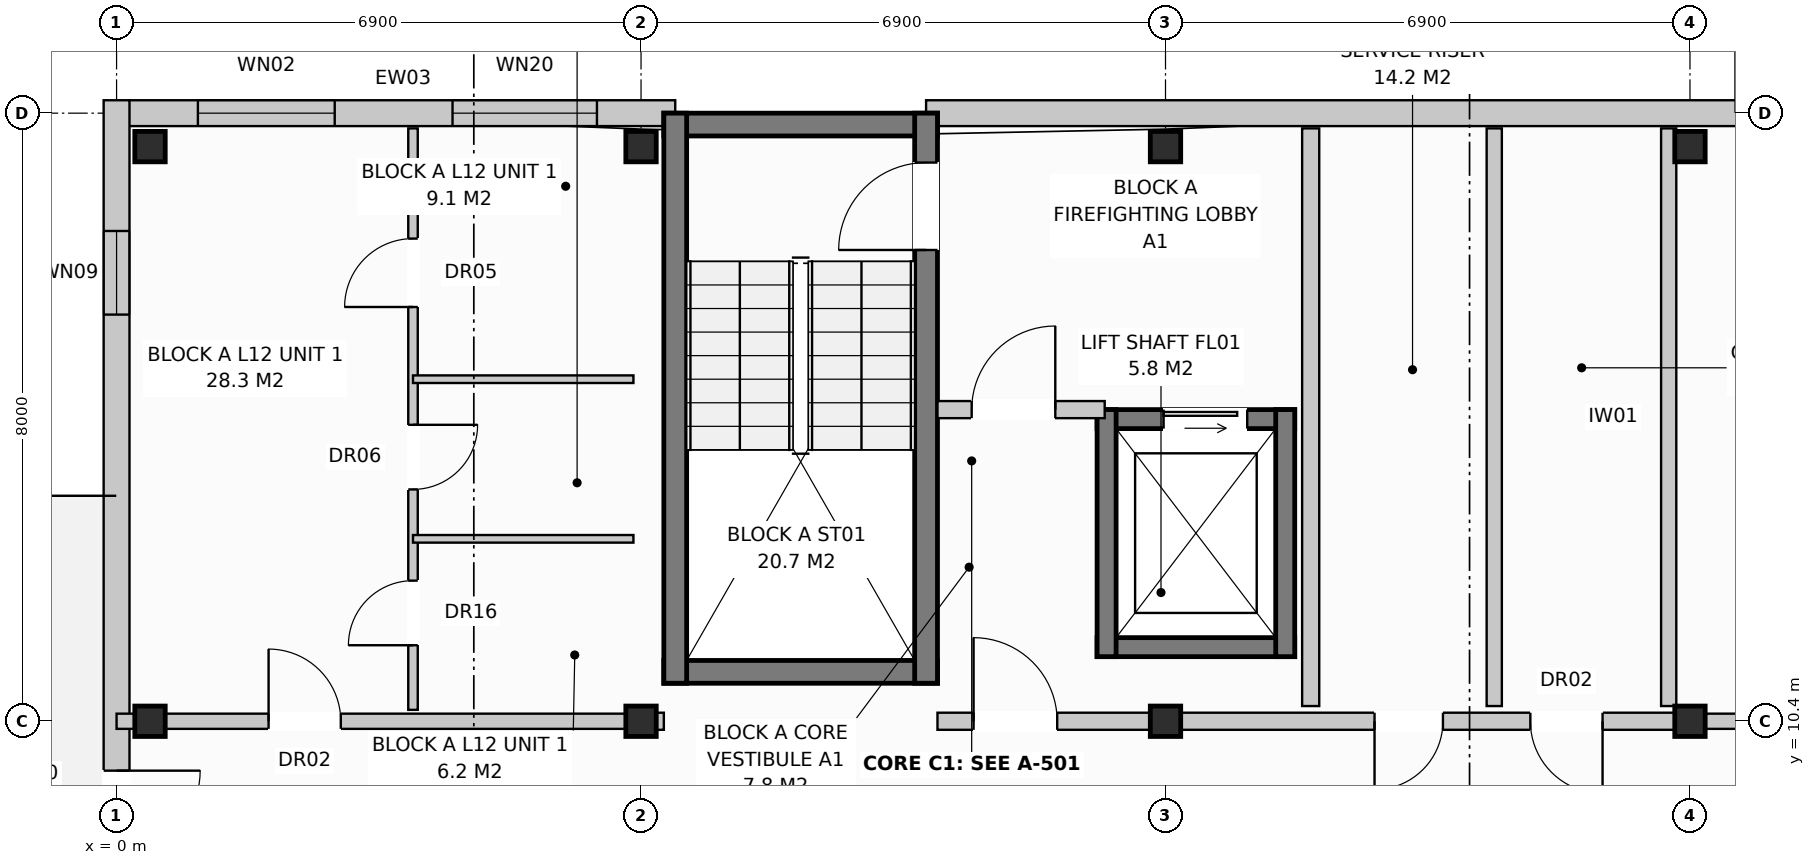
"""IFC4 building model, lengths in metres.
Left out: names, types, materials, properties, quantities, classifications, styles, units other than length and angle.
Written with IfcOpenShell. Run it as: python <this file> out.ifc"""

import sys

from ifc_helpers import new_model, si_unit, direction, frame, frame_2d, origin, origin_with_axes, origin_2d, place, context, subcontext, project, spatial, rectangle, extrude, element, fill, save


model = new_model("IFC4")
c1 = context("Model", 3, precision=1e-05, world=origin(), true_north=direction((0.0, 1.0)))
c2 = subcontext(c1, "Body", "Model", "MODEL_VIEW")
j1 = project(units=[si_unit("LENGTHUNIT", "METRE"), si_unit("PLANEANGLEUNIT", "RADIAN")], contexts=[c1])
p1 = place(None, origin())
s1 = spatial("IfcSite", under=j1, at=p1, CompositionType="ELEMENT")
p2 = place(p1, origin())
s2 = spatial("IfcBuilding", under=s1, at=p2, CompositionType="ELEMENT")
p3 = place(p2, frame((0.0, 0.0, 40.0)))
s3 = spatial("IfcBuildingStorey", under=s2, at=p3, CompositionType="ELEMENT", Elevation=40.0)
for number, where, z_axis, x_axis in (
    (1, (0.44, 10.4, 0.0), (0.0, 0.0, 1.0), (1.0, 0.0, 0.0)),
    (2, (0.44, 17.96, 0.0), (0.0, 0.0, 1.0), (1.0, 0.0, 0.0)),
    (3, (6.9, 10.4, 0.0), (0.0, 0.0, 1.0), (1.0, 0.0, 0.0)),
    (4, (6.9, 17.96, 0.0), (0.0, 0.0, 1.0), (1.0, 0.0, 0.0)),
    (5, (13.8, 10.4, 0.0), (0.0, 0.0, 1.0), (1.0, 0.0, 0.0)),
    (6, (13.8, 17.96, 0.0), (0.0, 0.0, 1.0), (1.0, 0.0, 0.0)),
    (7, (20.7, 10.4, 0.0), (0.0, 0.0, 1.0), (1.0, 0.0, 0.0)),
    (8, (20.7, 17.96, 0.0), (0.0, 0.0, 1.0), (1.0, 0.0, 0.0)),
):
    element("IfcColumn", number, at=place(p3, frame(where, z_axis=z_axis, x_axis=x_axis)), inside=s3, PredefinedType="COLUMN", context=c2, shape_type="SweptSolid", body=[
        extrude(rectangle(XDim=0.4, YDim=0.4, at=origin_2d()), origin(), (0.0, 0.0, 1.0), 3.2),
    ])
p4 = place(p3, frame((0.16, 18.4, 0.0), z_axis=(0.0, 0.0, 1.0), x_axis=(1.0, 0.0, 0.0)))
e9 = element("IfcWall", 9, at=p4, inside=s3, PredefinedType="STANDARD", context=c2, shape_type="SweptSolid", body=[
    extrude(rectangle(XDim=7.19, YDim=0.34, at=frame_2d((3.595, 0.0))), origin(), (0.0, 0.0, 1.0), 2.97),
])
p5 = place(p4, frame((0.91, 0.0, 0.8)))
e10 = element("IfcOpeningElement", 10, at=p5, cuts=e9, PredefinedType="OPENING", context=c2, shape_type="SweptSolid", body=[
    extrude(rectangle(XDim=1.8, YDim=1.7, at=frame_2d((0.9, 0.85))), frame((0.0, 0.182, 0.0), z_axis=(0.0, -1.0, 0.0), x_axis=(1.0, 0.0, 0.0)), (0.0, 0.0, 1.0), 0.364),
])
p6 = place(p4, frame((4.26, 0.0, 0.8)))
e11 = element("IfcOpeningElement", 11, at=p6, cuts=e9, PredefinedType="OPENING", context=c2, shape_type="SweptSolid", body=[
    extrude(rectangle(XDim=1.9, YDim=1.85, at=frame_2d((0.95, 0.925))), frame((0.0, 0.182, 0.0), z_axis=(0.0, -1.0, 0.0), x_axis=(1.0, 0.0, 0.0)), (0.0, 0.0, 1.0), 0.364),
])
p7 = place(p3, frame((10.65, 18.4, 0.0), z_axis=(0.0, 0.0, 1.0), x_axis=(1.0, 0.0, 0.0)))
e12 = element("IfcWall", 12, at=p7, inside=s3, PredefinedType="STANDARD", context=c2, shape_type="SweptSolid", body=[
    extrude(rectangle(XDim=17.4, YDim=0.34, at=frame_2d((8.7, 0.0))), origin(), (0.0, 0.0, 1.0), 2.97),
])
p8 = place(p7, frame((11.82, 0.0, 0.0)))
e13 = element("IfcOpeningElement", 13, at=p8, cuts=e12, PredefinedType="OPENING", context=c2, shape_type="SweptSolid", body=[
    extrude(rectangle(XDim=1.05, YDim=2.12, at=frame_2d((0.525, 1.06))), frame((0.0, 0.182, 0.0), z_axis=(0.0, -1.0, 0.0), x_axis=(1.0, 0.0, 0.0)), (0.0, 0.0, 1.0), 0.364),
])
p9 = place(p7, frame((14.87, 0.0, 0.72)))
e14 = element("IfcOpeningElement", 14, at=p9, cuts=e12, PredefinedType="OPENING", context=c2, shape_type="SweptSolid", body=[
    extrude(rectangle(XDim=1.1, YDim=1.5, at=frame_2d((0.55, 0.75))), frame((0.0, 0.182, 0.0), z_axis=(0.0, -1.0, 0.0), x_axis=(1.0, 0.0, 0.0)), (0.0, 0.0, 1.0), 0.364),
])
p10 = place(p3, frame((0.0, -0.17, 0.0), z_axis=(0.0, 0.0, 1.0), x_axis=(0.0, 1.0, 0.0)))
e15 = element("IfcWall", 15, at=p10, inside=s3, PredefinedType="STANDARD", context=c2, shape_type="SweptSolid", body=[
    extrude(rectangle(XDim=18.74, YDim=0.34, at=frame_2d((9.37, 0.0))), origin(), (0.0, 0.0, 1.0), 2.97),
])
p11 = place(p10, frame((8.82, 0.0, 0.0)))
e16 = element("IfcOpeningElement", 16, at=p11, cuts=e15, PredefinedType="OPENING", context=c2, shape_type="SweptSolid", body=[
    extrude(rectangle(XDim=1.1, YDim=2.1, at=frame_2d((0.55, 1.05))), frame((0.0, 0.182, 0.0), z_axis=(0.0, -1.0, 0.0), x_axis=(1.0, 0.0, 0.0)), (0.0, 0.0, 1.0), 0.364),
])
p12 = place(p10, frame((1.72, 0.0, 0.72)))
e17 = element("IfcOpeningElement", 17, at=p12, cuts=e15, PredefinedType="OPENING", context=c2, shape_type="SweptSolid", body=[
    extrude(rectangle(XDim=1.1, YDim=1.5, at=frame_2d((0.55, 0.75))), frame((0.0, 0.182, 0.0), z_axis=(0.0, -1.0, 0.0), x_axis=(1.0, 0.0, 0.0)), (0.0, 0.0, 1.0), 0.364),
])
p13 = place(p10, frame((15.92, 0.0, 0.72)))
e18 = element("IfcOpeningElement", 18, at=p13, cuts=e15, PredefinedType="OPENING", context=c2, shape_type="SweptSolid", body=[
    extrude(rectangle(XDim=1.1, YDim=1.5, at=frame_2d((0.55, 0.75))), frame((0.0, 0.182, 0.0), z_axis=(0.0, -1.0, 0.0), x_axis=(1.0, 0.0, 0.0)), (0.0, 0.0, 1.0), 0.364),
])
for number, where, z_axis, x_axis in (
    (19, (7.2, 18.25, 0.0), (0.0, 0.0, 1.0), (1.0, 0.0, 0.0)),
    (20, (7.2, 11.05, 0.0), (0.0, 0.0, 1.0), (1.0, 0.0, 0.0)),
):
    element("IfcWall", number, at=place(p3, frame(where, z_axis=z_axis, x_axis=x_axis)), inside=s3, PredefinedType="SHEAR", context=c2, shape_type="SweptSolid", body=[
        extrude(rectangle(XDim=3.6, YDim=0.3, at=frame_2d((1.8, 0.0))), origin(), (0.0, 0.0, 1.0), 2.97),
    ])
p14 = place(p3, frame((7.35, 10.9, 0.0), z_axis=(0.0, 0.0, 1.0), x_axis=(0.0, 1.0, 0.0)))
e21 = element("IfcWall", 21, at=p14, inside=s3, PredefinedType="SHEAR", context=c2, shape_type="SweptSolid", body=[
    extrude(rectangle(XDim=7.5, YDim=0.3, at=frame_2d((3.75, 0.0))), origin(), (0.0, 0.0, 1.0), 2.97),
])
p15 = place(p3, frame((10.65, 10.9, 0.0), z_axis=(0.0, 0.0, 1.0), x_axis=(0.0, 1.0, 0.0)))
e22 = element("IfcWall", 22, at=p15, inside=s3, PredefinedType="SHEAR", context=c2, shape_type="SweptSolid", body=[
    extrude(rectangle(XDim=7.5, YDim=0.3, at=frame_2d((3.75, 0.0))), origin(), (0.0, 0.0, 1.0), 2.97),
])
p16 = place(p15, frame((5.7, 0.0, 0.0)))
e23 = element("IfcOpeningElement", 23, at=p16, cuts=e22, PredefinedType="OPENING", context=c2, shape_type="SweptSolid", body=[
    extrude(rectangle(XDim=1.15, YDim=2.15, at=frame_2d((0.575, 1.075))), frame((0.0, 0.162, 0.0), z_axis=(0.0, -1.0, 0.0), x_axis=(1.0, 0.0, 0.0)), (0.0, 0.0, 1.0), 0.324),
])
p17 = place(p3, frame((12.9, 14.375, 0.0), z_axis=(0.0, 0.0, 1.0), x_axis=(1.0, 0.0, 0.0)))
e24 = element("IfcWall", 24, at=p17, inside=s3, PredefinedType="SHEAR", context=c2, shape_type="SweptSolid", body=[
    extrude(rectangle(XDim=2.6, YDim=0.25, at=frame_2d((1.3, 0.0))), origin(), (0.0, 0.0, 1.0), 2.97),
])
p18 = place(p17, frame((0.875, 0.0, 0.0)))
e25 = element("IfcOpeningElement", 25, at=p18, cuts=e24, PredefinedType="OPENING", context=c2, shape_type="SweptSolid", body=[
    extrude(rectangle(XDim=1.1, YDim=2.1, at=frame_2d((0.55, 1.05))), frame((0.0, 0.137, 0.0), z_axis=(0.0, -1.0, 0.0), x_axis=(1.0, 0.0, 0.0)), (0.0, 0.0, 1.0), 0.274),
])
p19 = place(p3, frame((12.9, 11.375, 0.0), z_axis=(0.0, 0.0, 1.0), x_axis=(1.0, 0.0, 0.0)))
e26 = element("IfcWall", 26, at=p19, inside=s3, PredefinedType="SHEAR", context=c2, shape_type="SweptSolid", body=[
    extrude(rectangle(XDim=2.6, YDim=0.25, at=frame_2d((1.3, 0.0))), origin(), (0.0, 0.0, 1.0), 2.97),
])
for number, where, z_axis, x_axis in (
    (27, (13.025, 11.25, 0.0), (0.0, 0.0, 1.0), (0.0, 1.0, 0.0)),
    (28, (15.375, 11.25, 0.0), (0.0, 0.0, 1.0), (0.0, 1.0, 0.0)),
):
    element("IfcWall", number, at=place(p3, frame(where, z_axis=z_axis, x_axis=x_axis)), inside=s3, PredefinedType="SHEAR", context=c2, shape_type="SweptSolid", body=[
        extrude(rectangle(XDim=3.25, YDim=0.25, at=frame_2d((1.625, 0.0))), origin(), (0.0, 0.0, 1.0), 2.97),
    ])
p20 = place(p3, frame((15.71, 10.6, 0.0), z_axis=(0.0, 0.0, 1.0), x_axis=(0.0, 1.0, 0.0)))
e29 = element("IfcWall", 29, at=p20, inside=s3, PredefinedType="PARTITIONING", context=c2, shape_type="SweptSolid", body=[
    extrude(rectangle(XDim=7.6, YDim=0.225, at=frame_2d((3.8, 0.0))), origin(), (0.0, 0.0, 1.0), 2.59),
])
p21 = place(p3, frame((10.8, 14.5, 0.0), z_axis=(0.0, 0.0, 1.0), x_axis=(1.0, 0.0, 0.0)))
e30 = element("IfcWall", 30, at=p21, inside=s3, PredefinedType="PARTITIONING", context=c2, shape_type="SweptSolid", body=[
    extrude(rectangle(XDim=2.2, YDim=0.225, at=frame_2d((1.1, 0.0))), origin(), (0.0, 0.0, 1.0), 2.97),
])
p22 = place(p21, frame((0.45, 0.0, 0.0)))
e31 = element("IfcOpeningElement", 31, at=p22, cuts=e30, PredefinedType="OPENING", context=c2, shape_type="SweptSolid", body=[
    extrude(rectangle(XDim=1.1, YDim=2.15, at=frame_2d((0.55, 1.075))), frame((0.0, 0.125, 0.0), z_axis=(0.0, -1.0, 0.0), x_axis=(1.0, 0.0, 0.0)), (0.0, 0.0, 1.0), 0.249),
])
p23 = place(p3, frame((6.9, 10.4, 0.0), z_axis=(0.0, 0.0, 1.0), x_axis=(1.0, 0.0, 0.0)))
e32 = element("IfcWall", 32, at=p23, inside=s3, PredefinedType="PARTITIONING", context=c2, shape_type="SweptSolid", body=[
    extrude(rectangle(XDim=0.3, YDim=0.225, at=frame_2d((0.15, 0.0))), origin(), (0.0, 0.0, 1.0), 2.97),
])
for number, where, z_axis, x_axis in (
    (33, (18.125, 10.6, 0.0), (0.0, 0.0, 1.0), (0.0, 1.0, 0.0)),
    (34, (20.42, 10.6, 0.0), (0.0, 0.0, 1.0), (0.0, 1.0, 0.0)),
):
    element("IfcWall", number, at=place(p3, frame(where, z_axis=z_axis, x_axis=x_axis)), inside=s3, PredefinedType="PARTITIONING", context=c2, shape_type="SweptSolid", body=[
        extrude(rectangle(XDim=7.6, YDim=0.2, at=frame_2d((3.8, 0.0))), origin(), (0.0, 0.0, 1.0), 2.97),
    ])
p24 = place(p3, frame((10.8, 10.4, 0.0), z_axis=(0.0, 0.0, 1.0), x_axis=(1.0, 0.0, 0.0)))
e35 = element("IfcWall", 35, at=p24, inside=s3, PredefinedType="PARTITIONING", context=c2, shape_type="SweptSolid", body=[
    extrude(rectangle(XDim=9.9, YDim=0.225, at=frame_2d((4.95, 0.0))), origin(), (0.0, 0.0, 1.0), 2.41),
])
p25 = place(p24, frame((0.475, 0.0, 0.0)))
e36 = element("IfcOpeningElement", 36, at=p25, cuts=e35, PredefinedType="OPENING", context=c2, shape_type="SweptSolid", body=[
    extrude(rectangle(XDim=1.1, YDim=2.15, at=frame_2d((0.55, 1.075))), frame((0.0, 0.125, 0.0), z_axis=(0.0, -1.0, 0.0), x_axis=(1.0, 0.0, 0.0)), (0.0, 0.0, 1.0), 0.249),
])
p26 = place(p24, frame((5.75, 0.0, 0.0)))
e37 = element("IfcOpeningElement", 37, at=p26, cuts=e35, PredefinedType="OPENING", context=c2, shape_type="SweptSolid", body=[
    extrude(rectangle(XDim=0.9, YDim=2.1, at=frame_2d((0.45, 1.05))), frame((0.0, 0.125, 0.0), z_axis=(0.0, -1.0, 0.0), x_axis=(1.0, 0.0, 0.0)), (0.0, 0.0, 1.0), 0.249),
])
p27 = place(p24, frame((7.8, 0.0, 0.0)))
e38 = element("IfcOpeningElement", 38, at=p27, cuts=e35, PredefinedType="OPENING", context=c2, shape_type="SweptSolid", body=[
    extrude(rectangle(XDim=0.95, YDim=2.15, at=frame_2d((0.475, 1.075))), frame((0.0, 0.125, 0.0), z_axis=(0.0, -1.0, 0.0), x_axis=(1.0, 0.0, 0.0)), (0.0, 0.0, 1.0), 0.249),
])
p28 = place(p3, frame((0.0, 10.4, 0.0), z_axis=(0.0, 0.0, 1.0), x_axis=(1.0, 0.0, 0.0)))
e39 = element("IfcWall", 39, at=p28, inside=s3, PredefinedType="PARTITIONING", context=c2, shape_type="SweptSolid", body=[
    extrude(rectangle(XDim=6.9, YDim=0.2, at=frame_2d((3.45, 0.0))), origin(), (0.0, 0.0, 1.0), 2.41),
])
p29 = place(p28, frame((2.0, 0.0, 0.0)))
e40 = element("IfcOpeningElement", 40, at=p29, cuts=e39, PredefinedType="OPENING", context=c2, shape_type="SweptSolid", body=[
    extrude(rectangle(XDim=0.95, YDim=2.15, at=frame_2d((0.475, 1.075))), frame((0.0, 0.112, 0.0), z_axis=(0.0, -1.0, 0.0), x_axis=(1.0, 0.0, 0.0)), (0.0, 0.0, 1.0), 0.224),
])
p30 = place(p3, frame((3.9, 10.55, 0.0), z_axis=(0.0, 0.0, 1.0), x_axis=(0.0, 1.0, 0.0)))
e41 = element("IfcWall", 41, at=p30, inside=s3, PredefinedType="PARTITIONING", context=c2, shape_type="SweptSolid", body=[
    extrude(rectangle(XDim=7.65, YDim=0.125, at=frame_2d((3.825, 0.0))), origin(), (0.0, 0.0, 1.0), 2.97),
])
p31 = place(p30, frame((0.85, 0.0, 0.0)))
e42 = element("IfcOpeningElement", 42, at=p31, cuts=e41, PredefinedType="OPENING", context=c2, shape_type="SweptSolid", body=[
    extrude(rectangle(XDim=0.85, YDim=2.1, at=frame_2d((0.425, 1.05))), frame((0.0, 0.074, 0.0), z_axis=(0.0, -1.0, 0.0), x_axis=(1.0, 0.0, 0.0)), (0.0, 0.0, 1.0), 0.149),
])
p32 = place(p30, frame((2.9, 0.0, 0.0)))
e43 = element("IfcOpeningElement", 43, at=p32, cuts=e41, PredefinedType="OPENING", context=c2, shape_type="SweptSolid", body=[
    extrude(rectangle(XDim=0.85, YDim=2.05, at=frame_2d((0.425, 1.025))), frame((0.0, 0.074, 0.0), z_axis=(0.0, -1.0, 0.0), x_axis=(1.0, 0.0, 0.0)), (0.0, 0.0, 1.0), 0.149),
])
p33 = place(p30, frame((5.3, 0.0, 0.0)))
e44 = element("IfcOpeningElement", 44, at=p33, cuts=e41, PredefinedType="OPENING", context=c2, shape_type="SweptSolid", body=[
    extrude(rectangle(XDim=0.9, YDim=2.1, at=frame_2d((0.45, 1.05))), frame((0.0, 0.074, 0.0), z_axis=(0.0, -1.0, 0.0), x_axis=(1.0, 0.0, 0.0)), (0.0, 0.0, 1.0), 0.149),
])
for number, where, z_axis, x_axis in (
    (45, (3.9, 12.8, 0.0), (0.0, 0.0, 1.0), (1.0, 0.0, 0.0)),
    (46, (3.9, 14.9, 0.0), (0.0, 0.0, 1.0), (1.0, 0.0, 0.0)),
):
    element("IfcWall", number, at=place(p3, frame(where, z_axis=z_axis, x_axis=x_axis)), inside=s3, PredefinedType="PARTITIONING", context=c2, shape_type="SweptSolid", body=[
        extrude(rectangle(XDim=2.9, YDim=0.1, at=frame_2d((1.45, 0.0))), origin(), (0.0, 0.0, 1.0), 2.97),
    ])
p34 = place(p3, frame((20.7, 10.4, 0.0), z_axis=(0.0, 0.0, 1.0), x_axis=(1.0, 0.0, 0.0)))
e47 = element("IfcWall", 47, at=p34, inside=s3, PredefinedType="PARTITIONING", context=c2, shape_type="SweptSolid", body=[
    extrude(rectangle(XDim=6.9, YDim=0.2, at=frame_2d((3.45, 0.0))), origin(), (0.0, 0.0, 1.0), 2.41),
])
p35 = place(p34, frame((2.0, 0.0, 0.0)))
e48 = element("IfcOpeningElement", 48, at=p35, cuts=e47, PredefinedType="OPENING", context=c2, shape_type="SweptSolid", body=[
    extrude(rectangle(XDim=0.95, YDim=2.15, at=frame_2d((0.475, 1.075))), frame((0.0, 0.112, 0.0), z_axis=(0.0, -1.0, 0.0), x_axis=(1.0, 0.0, 0.0)), (0.0, 0.0, 1.0), 0.224),
])
p36 = place(p5, origin_with_axes())
e49 = element("IfcWindow", 49, at=p36, inside=s3, PartitioningType="SINGLE_PANEL", PredefinedType="WINDOW", context=c2, shape_type="SweptSolid", body=[
    extrude(rectangle(XDim=1.8, YDim=1.7, at=frame_2d((0.9, 0.85))), frame((0.0, 0.03, 0.0), z_axis=(0.0, -1.0, 0.0), x_axis=(1.0, 0.0, 0.0)), (0.0, 0.0, 1.0), 0.06),
])
fill(e10, e49)
p37 = place(p6, origin_with_axes())
e50 = element("IfcWindow", 50, at=p37, inside=s3, PartitioningType="SINGLE_PANEL", PredefinedType="WINDOW", context=c2, shape_type="SweptSolid", body=[
    extrude(rectangle(XDim=1.9, YDim=1.85, at=frame_2d((0.95, 0.925))), frame((0.0, 0.03, 0.0), z_axis=(0.0, -1.0, 0.0), x_axis=(1.0, 0.0, 0.0)), (0.0, 0.0, 1.0), 0.06),
])
fill(e11, e50)
p38 = place(p11, frame((1.1, 0.0, 0.0), z_axis=(0.0, 0.0, 1.0), x_axis=(-1.0, 0.0, 0.0)))
e51 = element("IfcDoor", 51, at=p38, inside=s3, OperationType="SINGLE_SWING_RIGHT", PredefinedType="DOOR", context=c2, shape_type="SweptSolid", body=[
    extrude(rectangle(XDim=1.1, YDim=2.1, at=frame_2d((0.55, 1.05))), frame((0.0, 0.025, 0.0), z_axis=(0.0, -1.0, 0.0), x_axis=(1.0, 0.0, 0.0)), (0.0, 0.0, 1.0), 0.05),
])
fill(e16, e51)
p39 = place(p13, origin_with_axes())
e52 = element("IfcWindow", 52, at=p39, inside=s3, PartitioningType="SINGLE_PANEL", PredefinedType="WINDOW", context=c2, shape_type="SweptSolid", body=[
    extrude(rectangle(XDim=1.1, YDim=1.5, at=frame_2d((0.55, 0.75))), frame((0.0, 0.03, 0.0), z_axis=(0.0, -1.0, 0.0), x_axis=(1.0, 0.0, 0.0)), (0.0, 0.0, 1.0), 0.06),
])
fill(e18, e52)
p40 = place(p16, origin_with_axes())
e53 = element("IfcDoor", 53, at=p40, inside=s3, OperationType="SINGLE_SWING_LEFT", PredefinedType="DOOR", context=c2, shape_type="SweptSolid", body=[
    extrude(rectangle(XDim=1.15, YDim=2.15, at=frame_2d((0.575, 1.075))), frame((0.0, 0.025, 0.0), z_axis=(0.0, -1.0, 0.0), x_axis=(1.0, 0.0, 0.0)), (0.0, 0.0, 1.0), 0.05),
])
fill(e23, e53)
p41 = place(p18, origin_with_axes())
e54 = element("IfcDoor", 54, at=p41, inside=s3, OperationType="SLIDING_TO_LEFT", PredefinedType="DOOR", context=c2, shape_type="SweptSolid", body=[
    extrude(rectangle(XDim=1.1, YDim=2.1, at=frame_2d((0.55, 1.05))), frame((0.0, 0.025, 0.0), z_axis=(0.0, -1.0, 0.0), x_axis=(1.0, 0.0, 0.0)), (0.0, 0.0, 1.0), 0.05),
])
fill(e25, e54)
p42 = place(p22, origin_with_axes())
e55 = element("IfcDoor", 55, at=p42, inside=s3, OperationType="SINGLE_SWING_RIGHT", PredefinedType="DOOR", context=c2, shape_type="SweptSolid", body=[
    extrude(rectangle(XDim=1.1, YDim=2.15, at=frame_2d((0.55, 1.075))), frame((0.0, 0.025, 0.0), z_axis=(0.0, -1.0, 0.0), x_axis=(1.0, 0.0, 0.0)), (0.0, 0.0, 1.0), 0.05),
])
fill(e31, e55)
p43 = place(p25, origin_with_axes())
e56 = element("IfcDoor", 56, at=p43, inside=s3, OperationType="SINGLE_SWING_LEFT", PredefinedType="DOOR", context=c2, shape_type="SweptSolid", body=[
    extrude(rectangle(XDim=1.1, YDim=2.15, at=frame_2d((0.55, 1.075))), frame((0.0, 0.025, 0.0), z_axis=(0.0, -1.0, 0.0), x_axis=(1.0, 0.0, 0.0)), (0.0, 0.0, 1.0), 0.05),
])
fill(e36, e56)
p44 = place(p26, frame((0.9, 0.0, 0.0), z_axis=(0.0, 0.0, 1.0), x_axis=(-1.0, 0.0, 0.0)))
e57 = element("IfcDoor", 57, at=p44, inside=s3, OperationType="SINGLE_SWING_LEFT", PredefinedType="DOOR", context=c2, shape_type="SweptSolid", body=[
    extrude(rectangle(XDim=0.9, YDim=2.1, at=frame_2d((0.45, 1.05))), frame((0.0, 0.025, 0.0), z_axis=(0.0, -1.0, 0.0), x_axis=(1.0, 0.0, 0.0)), (0.0, 0.0, 1.0), 0.05),
])
fill(e37, e57)
p45 = place(p27, frame((0.95, 0.0, 0.0), z_axis=(0.0, 0.0, 1.0), x_axis=(-1.0, 0.0, 0.0)))
e58 = element("IfcDoor", 58, at=p45, inside=s3, OperationType="SINGLE_SWING_RIGHT", PredefinedType="DOOR", context=c2, shape_type="SweptSolid", body=[
    extrude(rectangle(XDim=0.95, YDim=2.15, at=frame_2d((0.475, 1.075))), frame((0.0, 0.025, 0.0), z_axis=(0.0, -1.0, 0.0), x_axis=(1.0, 0.0, 0.0)), (0.0, 0.0, 1.0), 0.05),
])
fill(e38, e58)
p46 = place(p29, origin_with_axes())
e59 = element("IfcDoor", 59, at=p46, inside=s3, OperationType="SINGLE_SWING_LEFT", PredefinedType="DOOR", context=c2, shape_type="SweptSolid", body=[
    extrude(rectangle(XDim=0.95, YDim=2.15, at=frame_2d((0.475, 1.075))), frame((0.0, 0.025, 0.0), z_axis=(0.0, -1.0, 0.0), x_axis=(1.0, 0.0, 0.0)), (0.0, 0.0, 1.0), 0.05),
])
fill(e40, e59)
p47 = place(p31, origin_with_axes())
e60 = element("IfcDoor", 60, at=p47, inside=s3, OperationType="SINGLE_SWING_LEFT", PredefinedType="DOOR", context=c2, shape_type="SweptSolid", body=[
    extrude(rectangle(XDim=0.85, YDim=2.1, at=frame_2d((0.425, 1.05))), frame((0.0, 0.025, 0.0), z_axis=(0.0, -1.0, 0.0), x_axis=(1.0, 0.0, 0.0)), (0.0, 0.0, 1.0), 0.05),
])
fill(e42, e60)
p48 = place(p32, frame((0.85, 0.0, 0.0), z_axis=(0.0, 0.0, 1.0), x_axis=(-1.0, 0.0, 0.0)))
e61 = element("IfcDoor", 61, at=p48, inside=s3, OperationType="SINGLE_SWING_RIGHT", PredefinedType="DOOR", context=c2, shape_type="SweptSolid", body=[
    extrude(rectangle(XDim=0.85, YDim=2.05, at=frame_2d((0.425, 1.025))), frame((0.0, 0.025, 0.0), z_axis=(0.0, -1.0, 0.0), x_axis=(1.0, 0.0, 0.0)), (0.0, 0.0, 1.0), 0.05),
])
fill(e43, e61)
p49 = place(p33, origin_with_axes())
e62 = element("IfcDoor", 62, at=p49, inside=s3, OperationType="SINGLE_SWING_LEFT", PredefinedType="DOOR", context=c2, shape_type="SweptSolid", body=[
    extrude(rectangle(XDim=0.9, YDim=2.1, at=frame_2d((0.45, 1.05))), frame((0.0, 0.025, 0.0), z_axis=(0.0, -1.0, 0.0), x_axis=(1.0, 0.0, 0.0)), (0.0, 0.0, 1.0), 0.05),
])
fill(e44, e62)
save(model, sys.argv[1])
